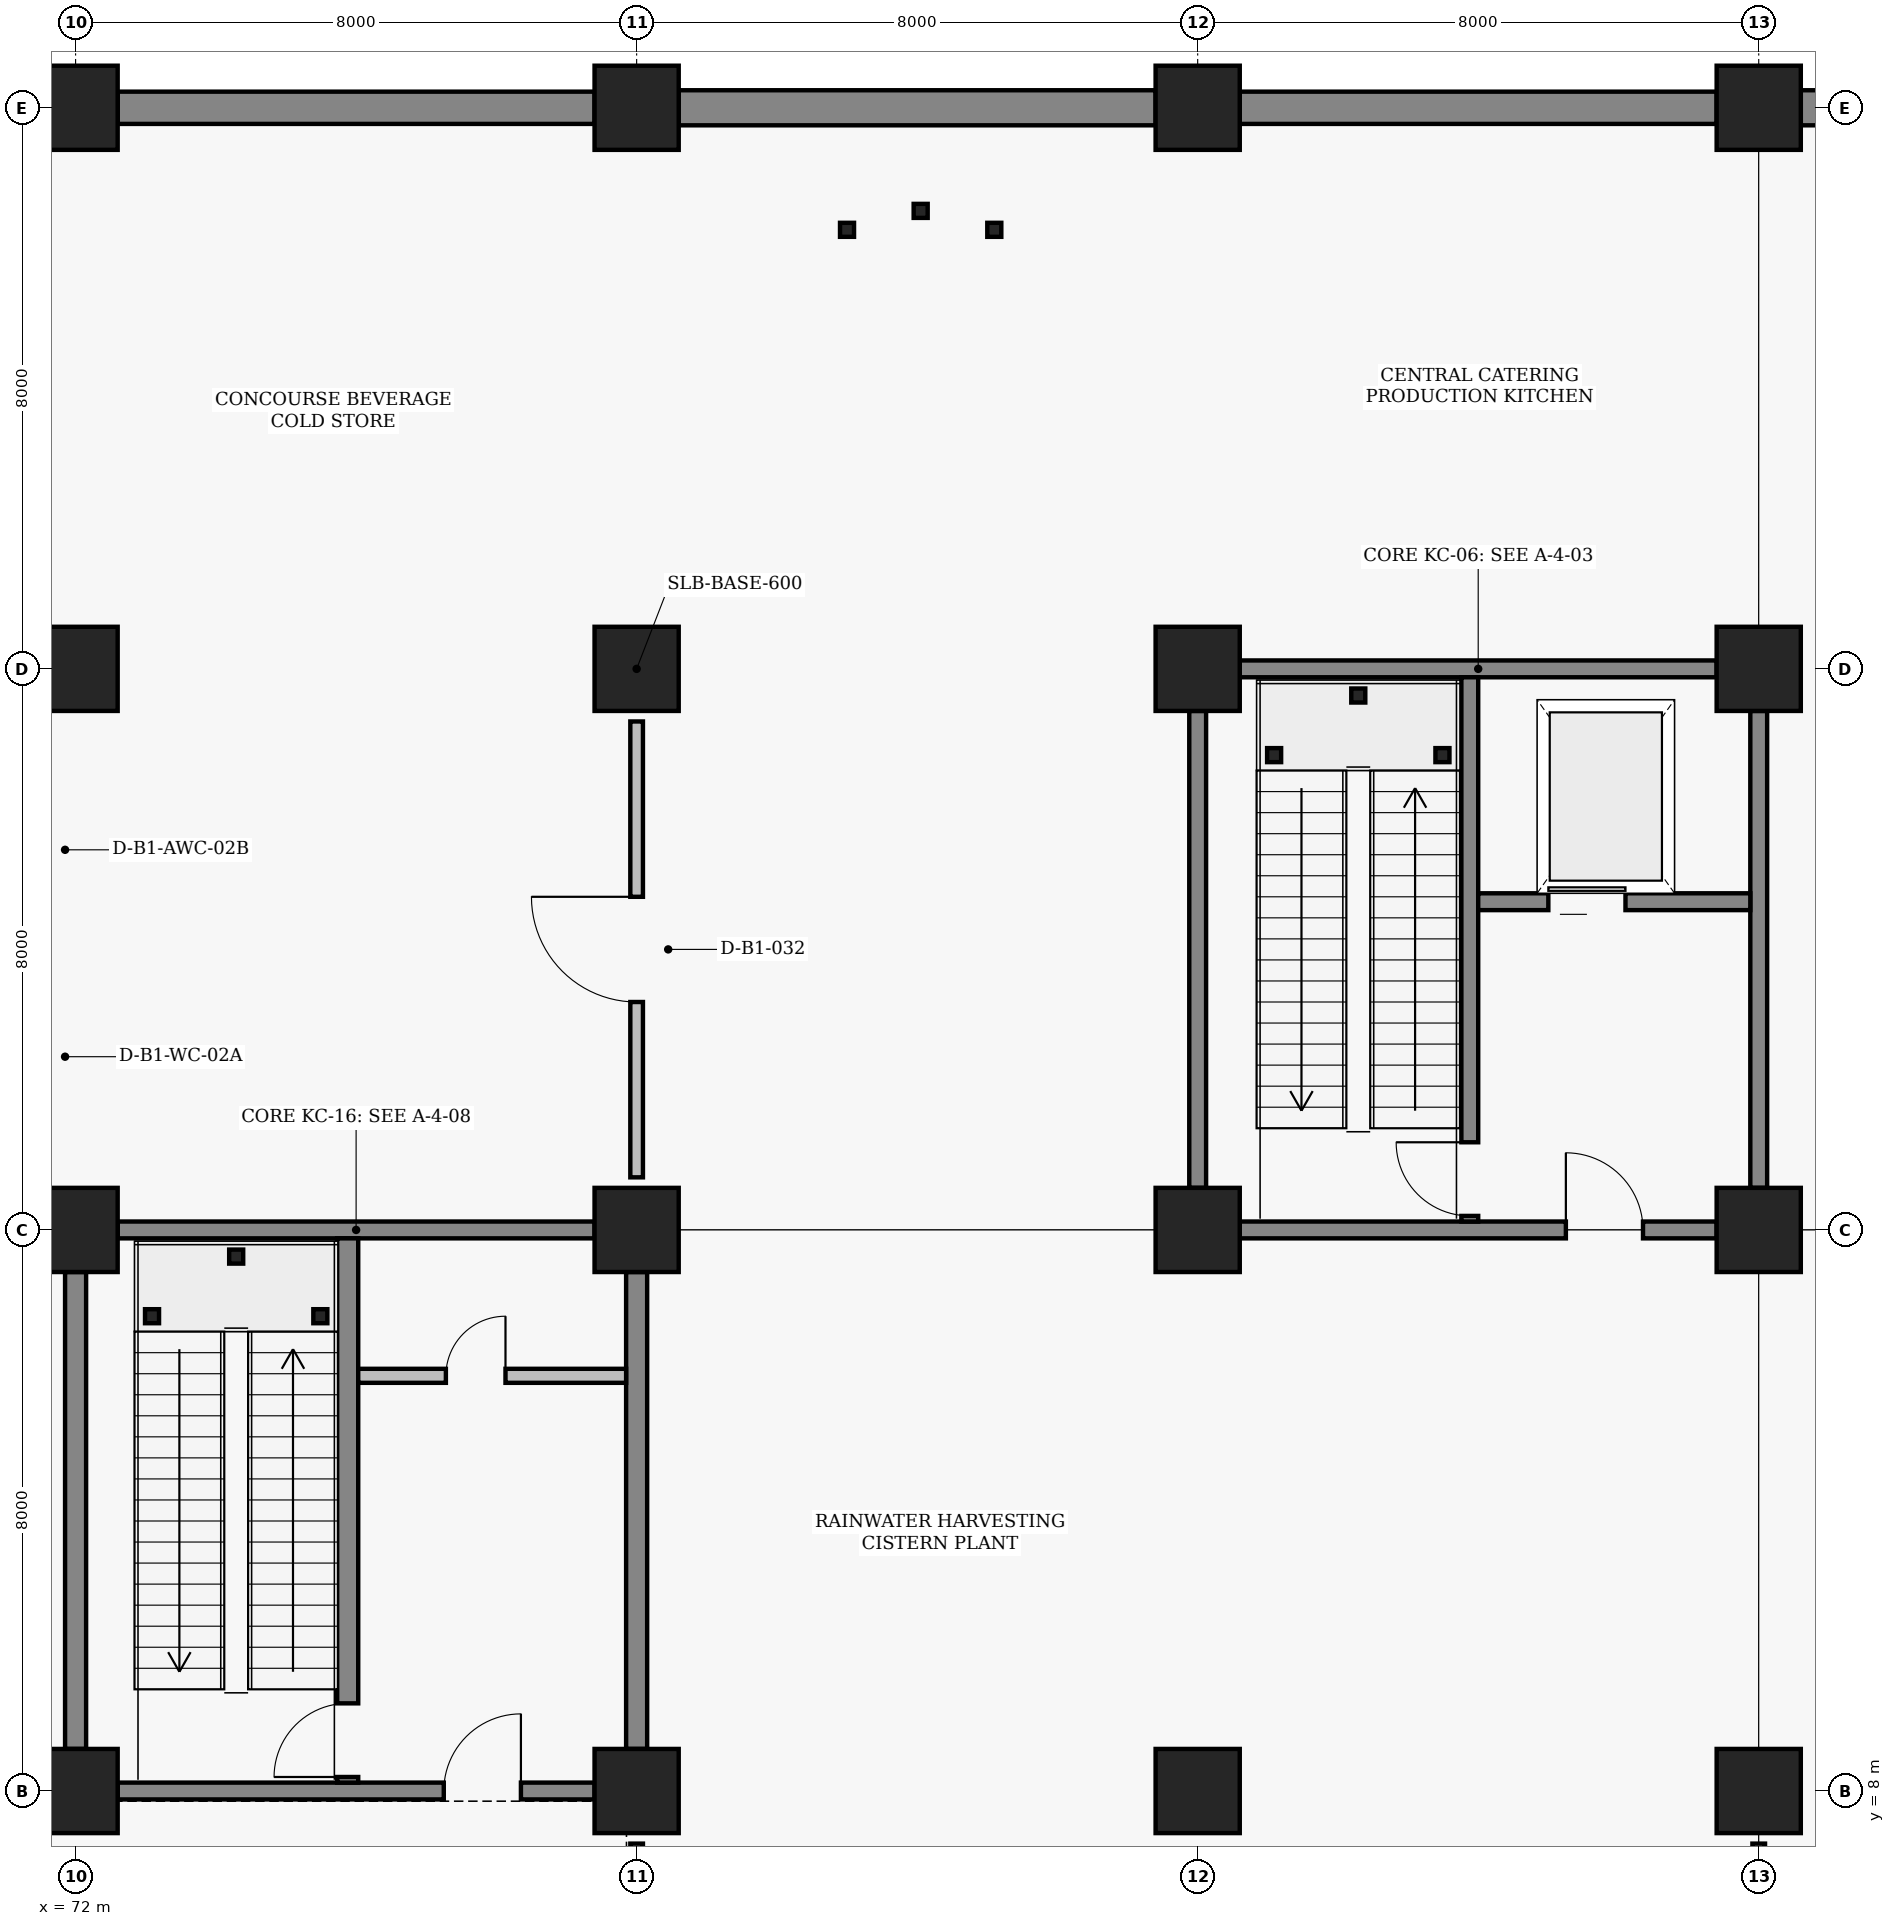
"""IFC4 building model, lengths in metres.
Left out: names, types, materials, properties, quantities, classifications, styles, units other than length and angle.
Written with IfcOpenShell. Run it as: python <this file> out.ifc"""

import sys

from ifc_helpers import new_model, si_unit, direction, frame, frame_2d, origin, origin_2d, place, context, subcontext, project, spatial, rectangle, hollow_rectangle, extrude, element, fill, save


model = new_model("IFC4")
c1 = context("Model", 3, precision=1e-05, world=origin(), true_north=direction((0.0, 1.0)))
c2 = subcontext(c1, "Body", "Model", "MODEL_VIEW")
j1 = project(units=[si_unit("LENGTHUNIT", "METRE"), si_unit("PLANEANGLEUNIT", "RADIAN")], contexts=[c1])
p1 = place(None, origin())
s1 = spatial("IfcSite", under=j1, at=p1, CompositionType="ELEMENT")
p2 = place(p1, origin())
s2 = spatial("IfcBuilding", under=s1, at=p2, CompositionType="ELEMENT")
p3 = place(p2, frame((0.0, 0.0, -5.4)))
s3 = spatial("IfcBuildingStorey", under=s2, at=p3, CompositionType="ELEMENT", Elevation=-5.4)
for number, where, z_axis, x_axis in (
    (1, (72.0, 8.0, 0.0), (0.0, 0.0, 1.0), (1.0, 0.0, 0.0)),
    (2, (72.0, 16.0, 0.0), (0.0, 0.0, 1.0), (1.0, 0.0, 0.0)),
    (3, (72.0, 24.0, 0.0), (0.0, 0.0, 1.0), (1.0, 0.0, 0.0)),
    (4, (72.0, 32.0, 0.0), (0.0, 0.0, 1.0), (1.0, 0.0, 0.0)),
    (5, (80.0, 8.0, 0.0), (0.0, 0.0, 1.0), (1.0, 0.0, 0.0)),
    (6, (80.0, 16.0, 0.0), (0.0, 0.0, 1.0), (1.0, 0.0, 0.0)),
    (7, (80.0, 24.0, 0.0), (0.0, 0.0, 1.0), (1.0, 0.0, 0.0)),
    (8, (80.0, 32.0, 0.0), (0.0, 0.0, 1.0), (1.0, 0.0, 0.0)),
    (9, (88.0, 8.0, 0.0), (0.0, 0.0, 1.0), (1.0, 0.0, 0.0)),
    (10, (88.0, 16.0, 0.0), (0.0, 0.0, 1.0), (1.0, 0.0, 0.0)),
    (11, (88.0, 24.0, 0.0), (0.0, 0.0, 1.0), (1.0, 0.0, 0.0)),
    (12, (88.0, 32.0, 0.0), (0.0, 0.0, 1.0), (1.0, 0.0, 0.0)),
    (13, (96.0, 8.0, 0.0), (0.0, 0.0, 1.0), (1.0, 0.0, 0.0)),
    (14, (96.0, 16.0, 0.0), (0.0, 0.0, 1.0), (1.0, 0.0, 0.0)),
    (15, (96.0, 24.0, 0.0), (0.0, 0.0, 1.0), (1.0, 0.0, 0.0)),
    (16, (96.0, 32.0, 0.0), (0.0, 0.0, 1.0), (1.0, 0.0, 0.0)),
):
    element("IfcColumn", number, at=place(p3, frame(where, z_axis=z_axis, x_axis=x_axis)), inside=s3, PredefinedType="COLUMN", context=c2, shape_type="SweptSolid", body=[
        extrude(rectangle(XDim=1.2, YDim=1.2, at=origin_2d()), origin(), (0.0, 0.0, 1.0), 5.4),
    ])
p4 = place(p3, frame((72.6, 32.0, 0.0), z_axis=(0.0, 0.0, 1.0), x_axis=(1.0, 0.0, 0.0)))
e17 = element("IfcWall", 17, at=p4, inside=s3, PredefinedType="STANDARD", context=c2, shape_type="SweptSolid", body=[
    extrude(rectangle(XDim=6.8, YDim=0.46, at=frame_2d((3.4, 0.0))), origin(), (0.0, 0.0, 1.0), 4.34),
])
p5 = place(p3, frame((80.6, 32.0, 0.0), z_axis=(0.0, 0.0, 1.0), x_axis=(1.0, 0.0, 0.0)))
e18 = element("IfcWall", 18, at=p5, inside=s3, PredefinedType="STANDARD", context=c2, shape_type="SweptSolid", body=[
    extrude(rectangle(XDim=6.8, YDim=0.5, at=frame_2d((3.4, 0.0))), origin(), (0.0, 0.0, 1.0), 4.34),
])
p6 = place(p3, frame((88.6, 32.0, 0.0), z_axis=(0.0, 0.0, 1.0), x_axis=(1.0, 0.0, 0.0)))
e19 = element("IfcWall", 19, at=p6, inside=s3, PredefinedType="STANDARD", context=c2, shape_type="SweptSolid", body=[
    extrude(rectangle(XDim=6.8, YDim=0.46, at=frame_2d((3.4, 0.0))), origin(), (0.0, 0.0, 1.0), 4.34),
])
p7 = place(p3, frame((96.6, 32.0, 0.0), z_axis=(0.0, 0.0, 1.0), x_axis=(1.0, 0.0, 0.0)))
e20 = element("IfcWall", 20, at=p7, inside=s3, PredefinedType="STANDARD", context=c2, shape_type="SweptSolid", body=[
    extrude(rectangle(XDim=6.8, YDim=0.5, at=frame_2d((3.4, 0.0))), origin(), (0.0, 0.0, 1.0), 4.34),
])
p8 = place(p3, frame((88.6, 16.0, 0.0), z_axis=(0.0, 0.0, 1.0), x_axis=(1.0, 0.0, 0.0)))
e21 = element("IfcWall", 21, at=p8, inside=s3, PredefinedType="SHEAR", context=c2, shape_type="SweptSolid", body=[
    extrude(rectangle(XDim=6.8, YDim=0.24, at=frame_2d((3.4, 0.0))), origin(), (0.0, 0.0, 1.0), 3.64),
])
p9 = place(p8, frame((4.65, 0.0, 0.0)))
e22 = element("IfcOpeningElement", 22, at=p9, cuts=e21, PredefinedType="OPENING", context=c2, shape_type="SweptSolid", body=[
    extrude(rectangle(XDim=1.1, YDim=2.2, at=frame_2d((0.55, 1.1))), frame((0.0, 0.13, 0.0), z_axis=(0.0, -1.0, 0.0), x_axis=(1.0, 0.0, 0.0)), (0.0, 0.0, 1.0), 0.26),
])
p10 = place(p3, frame((88.6, 24.0, 0.0), z_axis=(0.0, 0.0, 1.0), x_axis=(1.0, 0.0, 0.0)))
e23 = element("IfcWall", 23, at=p10, inside=s3, PredefinedType="SHEAR", context=c2, shape_type="SweptSolid", body=[
    extrude(rectangle(XDim=6.8, YDim=0.24, at=frame_2d((3.4, 0.0))), origin(), (0.0, 0.0, 1.0), 4.59),
])
p11 = place(p3, frame((88.0, 16.6, 0.0), z_axis=(0.0, 0.0, 1.0), x_axis=(0.0, 1.0, 0.0)))
e24 = element("IfcWall", 24, at=p11, inside=s3, PredefinedType="SHEAR", context=c2, shape_type="SweptSolid", body=[
    extrude(rectangle(XDim=6.8, YDim=0.24, at=frame_2d((3.4, 0.0))), origin(), (0.0, 0.0, 1.0), 4.39),
])
p12 = place(p3, frame((96.0, 16.6, 0.0), z_axis=(0.0, 0.0, 1.0), x_axis=(0.0, 1.0, 0.0)))
e25 = element("IfcWall", 25, at=p12, inside=s3, PredefinedType="SHEAR", context=c2, shape_type="SweptSolid", body=[
    extrude(rectangle(XDim=6.8, YDim=0.24, at=frame_2d((3.4, 0.0))), origin(), (0.0, 0.0, 1.0), 3.64),
])
p13 = place(p3, frame((91.88, 16.12, 0.0), z_axis=(0.0, 0.0, 1.0), x_axis=(0.0, 1.0, 0.0)))
e26 = element("IfcWall", 26, at=p13, inside=s3, PredefinedType="SHEAR", context=c2, shape_type="SweptSolid", body=[
    extrude(rectangle(XDim=7.76, YDim=0.24, at=frame_2d((3.88, 0.0))), origin(), (0.0, 0.0, 1.0), 4.54),
])
p14 = place(p13, frame((0.08, 0.0, 0.0)))
e27 = element("IfcOpeningElement", 27, at=p14, cuts=e26, PredefinedType="OPENING", context=c2, shape_type="SweptSolid", body=[
    extrude(rectangle(XDim=1.05, YDim=2.15, at=frame_2d((0.525, 1.075))), frame((0.0, 0.13, 0.0), z_axis=(0.0, -1.0, 0.0), x_axis=(1.0, 0.0, 0.0)), (0.0, 0.0, 1.0), 0.26),
])
p15 = place(p3, frame((92.0, 20.68, 0.0), z_axis=(0.0, 0.0, 1.0), x_axis=(1.0, 0.0, 0.0)))
e28 = element("IfcWall", 28, at=p15, inside=s3, PredefinedType="SHEAR", context=c2, shape_type="SweptSolid", body=[
    extrude(rectangle(XDim=3.88, YDim=0.24, at=frame_2d((1.94, 0.0))), origin(), (0.0, 0.0, 1.0), 4.39),
])
p16 = place(p15, frame((1.0, 0.0, 0.0)))
e29 = element("IfcOpeningElement", 29, at=p16, cuts=e28, PredefinedType="OPENING", context=c2, shape_type="SweptSolid", body=[
    extrude(rectangle(XDim=1.1, YDim=2.15, at=frame_2d((0.55, 1.075))), frame((0.0, 0.13, 0.0), z_axis=(0.0, -1.0, 0.0), x_axis=(1.0, 0.0, 0.0)), (0.0, 0.0, 1.0), 0.26),
])
for number, where, z_axis, x_axis in (
    (30, (89.09, 22.77, 0.0), (0.0, 0.0, 1.0), (1.0, 0.0, 0.0)),
    (31, (91.49, 22.77, 0.0), (0.0, 0.0, 1.0), (1.0, 0.0, 0.0)),
    (32, (90.29, 23.62, 0.0), (0.0, 0.0, 1.0), (1.0, 0.0, 0.0)),
):
    element("IfcColumn", number, at=place(p3, frame(where, z_axis=z_axis, x_axis=x_axis)), inside=s3, PredefinedType="COLUMN", context=c2, shape_type="SweptSolid", body=[
        extrude(hollow_rectangle(XDim=0.2, YDim=0.2, WallThickness=0.009, at=origin_2d()), origin(), (0.0, 0.0, 1.0), 2.5),
    ])
p17 = place(p3, frame((72.6, 8.0, 0.0), z_axis=(0.0, 0.0, 1.0), x_axis=(1.0, 0.0, 0.0)))
e33 = element("IfcWall", 33, at=p17, inside=s3, PredefinedType="SHEAR", context=c2, shape_type="SweptSolid", body=[
    extrude(rectangle(XDim=6.8, YDim=0.24, at=frame_2d((3.4, 0.0))), origin(), (0.0, 0.0, 1.0), 4.54),
])
p18 = place(p17, frame((4.65, 0.0, 0.0)))
e34 = element("IfcOpeningElement", 34, at=p18, cuts=e33, PredefinedType="OPENING", context=c2, shape_type="SweptSolid", body=[
    extrude(rectangle(XDim=1.1, YDim=2.2, at=frame_2d((0.55, 1.1))), frame((0.0, 0.13, 0.0), z_axis=(0.0, -1.0, 0.0), x_axis=(1.0, 0.0, 0.0)), (0.0, 0.0, 1.0), 0.26),
])
p19 = place(p3, frame((72.6, 16.0, 0.0), z_axis=(0.0, 0.0, 1.0), x_axis=(1.0, 0.0, 0.0)))
e35 = element("IfcWall", 35, at=p19, inside=s3, PredefinedType="SHEAR", context=c2, shape_type="SweptSolid", body=[
    extrude(rectangle(XDim=6.8, YDim=0.24, at=frame_2d((3.4, 0.0))), origin(), (0.0, 0.0, 1.0), 4.54),
])
for number, where, z_axis, x_axis in (
    (36, (72.0, 8.6, 0.0), (0.0, 0.0, 1.0), (0.0, 1.0, 0.0)),
    (37, (80.0, 8.6, 0.0), (0.0, 0.0, 1.0), (0.0, 1.0, 0.0)),
):
    element("IfcWall", number, at=place(p3, frame(where, z_axis=z_axis, x_axis=x_axis)), inside=s3, PredefinedType="SHEAR", context=c2, shape_type="SweptSolid", body=[
        extrude(rectangle(XDim=6.8, YDim=0.3, at=frame_2d((3.4, 0.0))), origin(), (0.0, 0.0, 1.0), 4.34),
    ])
p20 = place(p3, frame((75.88, 8.12, 0.0), z_axis=(0.0, 0.0, 1.0), x_axis=(0.0, 1.0, 0.0)))
e38 = element("IfcWall", 38, at=p20, inside=s3, PredefinedType="SHEAR", context=c2, shape_type="SweptSolid", body=[
    extrude(rectangle(XDim=7.76, YDim=0.3, at=frame_2d((3.88, 0.0))), origin(), (0.0, 0.0, 1.0), 4.54),
])
p21 = place(p20, frame((0.08, 0.0, 0.0)))
e39 = element("IfcOpeningElement", 39, at=p21, cuts=e38, PredefinedType="OPENING", context=c2, shape_type="SweptSolid", body=[
    extrude(rectangle(XDim=1.05, YDim=2.15, at=frame_2d((0.525, 1.075))), frame((0.0, 0.16, 0.0), z_axis=(0.0, -1.0, 0.0), x_axis=(1.0, 0.0, 0.0)), (0.0, 0.0, 1.0), 0.32),
])
p22 = place(p3, frame((76.03, 13.92, 0.0), z_axis=(0.0, 0.0, 1.0), x_axis=(1.0, 0.0, 0.0)))
e40 = element("IfcWall", 40, at=p22, inside=s3, PredefinedType="PARTITIONING", context=c2, shape_type="SweptSolid", body=[
    extrude(rectangle(XDim=3.82, YDim=0.2, at=frame_2d((1.91, 0.0))), origin(), (0.0, 0.0, 1.0), 4.34),
])
p23 = place(p22, frame((1.25, 0.0, 0.0)))
e41 = element("IfcOpeningElement", 41, at=p23, cuts=e40, PredefinedType="OPENING", context=c2, shape_type="SweptSolid", body=[
    extrude(rectangle(XDim=0.85, YDim=2.05, at=frame_2d((0.425, 1.025))), frame((0.0, 0.11, 0.0), z_axis=(0.0, -1.0, 0.0), x_axis=(1.0, 0.0, 0.0)), (0.0, 0.0, 1.0), 0.22),
])
for number, where, z_axis, x_axis in (
    (42, (73.09, 14.77, 0.0), (0.0, 0.0, 1.0), (1.0, 0.0, 0.0)),
    (43, (75.49, 14.77, 0.0), (0.0, 0.0, 1.0), (1.0, 0.0, 0.0)),
    (44, (74.29, 15.62, 0.0), (0.0, 0.0, 1.0), (1.0, 0.0, 0.0)),
):
    element("IfcColumn", number, at=place(p3, frame(where, z_axis=z_axis, x_axis=x_axis)), inside=s3, PredefinedType="COLUMN", context=c2, shape_type="SweptSolid", body=[
        extrude(hollow_rectangle(XDim=0.2, YDim=0.2, WallThickness=0.009, at=origin_2d()), origin(), (0.0, 0.0, 1.0), 2.5),
    ])
for number, where, z_axis, x_axis in (
    (45, (83.0, 30.26, 0.0), (0.0, 0.0, 1.0), (1.0, 0.0, 0.0)),
    (46, (85.1, 30.26, 0.0), (0.0, 0.0, 1.0), (1.0, 0.0, 0.0)),
    (47, (84.05, 30.53, 0.0), (0.0, 0.0, 1.0), (1.0, 0.0, 0.0)),
):
    element("IfcColumn", number, at=place(p3, frame(where, z_axis=z_axis, x_axis=x_axis)), inside=s3, PredefinedType="COLUMN", context=c2, shape_type="SweptSolid", body=[
        extrude(hollow_rectangle(XDim=0.2, YDim=0.2, WallThickness=0.009, at=origin_2d()), origin(), (0.0, 0.0, 1.0), 5.4),
    ])
p24 = place(p3, frame((80.0, 16.75, 0.0), z_axis=(0.0, 0.0, 1.0), x_axis=(0.0, 1.0, 0.0)))
e48 = element("IfcWall", 48, at=p24, inside=s3, PredefinedType="PARTITIONING", context=c2, shape_type="SweptSolid", body=[
    extrude(rectangle(XDim=6.5, YDim=0.18, at=frame_2d((3.25, 0.0))), origin(), (0.0, 0.0, 1.0), 4.39),
])
p25 = place(p24, frame((2.5, 0.0, 0.0)))
e49 = element("IfcOpeningElement", 49, at=p25, cuts=e48, PredefinedType="OPENING", context=c2, shape_type="SweptSolid", body=[
    extrude(rectangle(XDim=1.5, YDim=2.2, at=frame_2d((0.75, 1.1))), frame((0.0, 0.1, 0.0), z_axis=(0.0, -1.0, 0.0), x_axis=(1.0, 0.0, 0.0)), (0.0, 0.0, 1.0), 0.2),
])
p26 = place(p3, frame((80.0, 0.75, 0.0), z_axis=(0.0, 0.0, 1.0), x_axis=(0.0, 1.0, 0.0)))
e50 = element("IfcWall", 50, at=p26, inside=s3, PredefinedType="PARTITIONING", context=c2, shape_type="SweptSolid", body=[
    extrude(rectangle(XDim=6.5, YDim=0.18, at=frame_2d((3.25, 0.0))), origin(), (0.0, 0.0, 1.0), 4.34),
])
p27 = place(p26, frame((2.55, 0.0, 0.0)))
e51 = element("IfcOpeningElement", 51, at=p27, cuts=e50, PredefinedType="OPENING", context=c2, shape_type="SweptSolid", body=[
    extrude(rectangle(XDim=1.4, YDim=2.2, at=frame_2d((0.7, 1.1))), frame((0.0, 0.1, 0.0), z_axis=(0.0, -1.0, 0.0), x_axis=(1.0, 0.0, 0.0)), (0.0, 0.0, 1.0), 0.2),
])
p28 = place(p3, frame((96.0, 0.75, 0.0), z_axis=(0.0, 0.0, 1.0), x_axis=(0.0, 1.0, 0.0)))
e52 = element("IfcWall", 52, at=p28, inside=s3, PredefinedType="PARTITIONING", context=c2, shape_type="SweptSolid", body=[
    extrude(rectangle(XDim=6.5, YDim=0.18, at=frame_2d((3.25, 0.0))), origin(), (0.0, 0.0, 1.0), 4.34),
])
p29 = place(p28, frame((2.55, 0.0, 0.0)))
e53 = element("IfcOpeningElement", 53, at=p29, cuts=e52, PredefinedType="OPENING", context=c2, shape_type="SweptSolid", body=[
    extrude(rectangle(XDim=1.4, YDim=2.2, at=frame_2d((0.7, 1.1))), frame((0.0, 0.1, 0.0), z_axis=(0.0, -1.0, 0.0), x_axis=(1.0, 0.0, 0.0)), (0.0, 0.0, 1.0), 0.2),
])
p30 = place(p9, origin())
e54 = element("IfcDoor", 54, at=p30, inside=s3, OperationType="SINGLE_SWING_LEFT", PredefinedType="DOOR", context=c2, shape_type="SweptSolid", body=[
    extrude(rectangle(XDim=1.1, YDim=2.2, at=frame_2d((0.55, 1.1))), frame((0.0, 0.025, 0.0), z_axis=(0.0, -1.0, 0.0), x_axis=(1.0, 0.0, 0.0)), (0.0, 0.0, 1.0), 0.05),
])
fill(e22, e54)
p31 = place(p14, origin())
e55 = element("IfcDoor", 55, at=p31, inside=s3, OperationType="SINGLE_SWING_RIGHT", PredefinedType="DOOR", context=c2, shape_type="SweptSolid", body=[
    extrude(rectangle(XDim=1.05, YDim=2.15, at=frame_2d((0.525, 1.075))), frame((0.0, 0.025, 0.0), z_axis=(0.0, -1.0, 0.0), x_axis=(1.0, 0.0, 0.0)), (0.0, 0.0, 1.0), 0.05),
])
fill(e27, e55)
p32 = place(p16, origin())
e56 = element("IfcDoor", 56, at=p32, inside=s3, OperationType="SLIDING_TO_LEFT", PredefinedType="DOOR", context=c2, shape_type="SweptSolid", body=[
    extrude(rectangle(XDim=1.1, YDim=2.15, at=frame_2d((0.55, 1.075))), frame((0.0, 0.025, 0.0), z_axis=(0.0, -1.0, 0.0), x_axis=(1.0, 0.0, 0.0)), (0.0, 0.0, 1.0), 0.05),
])
fill(e29, e56)
p33 = place(p18, origin())
e57 = element("IfcDoor", 57, at=p33, inside=s3, OperationType="SINGLE_SWING_RIGHT", PredefinedType="DOOR", context=c2, shape_type="SweptSolid", body=[
    extrude(rectangle(XDim=1.1, YDim=2.2, at=frame_2d((0.55, 1.1))), frame((0.0, 0.025, 0.0), z_axis=(0.0, -1.0, 0.0), x_axis=(1.0, 0.0, 0.0)), (0.0, 0.0, 1.0), 0.05),
])
fill(e34, e57)
p34 = place(p21, origin())
e58 = element("IfcDoor", 58, at=p34, inside=s3, OperationType="SINGLE_SWING_LEFT", PredefinedType="DOOR", context=c2, shape_type="SweptSolid", body=[
    extrude(rectangle(XDim=1.05, YDim=2.15, at=frame_2d((0.525, 1.075))), frame((0.0, 0.025, 0.0), z_axis=(0.0, -1.0, 0.0), x_axis=(1.0, 0.0, 0.0)), (0.0, 0.0, 1.0), 0.05),
])
fill(e39, e58)
p35 = place(p23, origin())
e59 = element("IfcDoor", 59, at=p35, inside=s3, OperationType="SINGLE_SWING_RIGHT", PredefinedType="TRAPDOOR", context=c2, shape_type="SweptSolid", body=[
    extrude(rectangle(XDim=0.85, YDim=2.05, at=frame_2d((0.425, 1.025))), frame((0.0, 0.025, 0.0), z_axis=(0.0, -1.0, 0.0), x_axis=(1.0, 0.0, 0.0)), (0.0, 0.0, 1.0), 0.05),
])
fill(e41, e59)
p36 = place(p25, origin())
e60 = element("IfcDoor", 60, at=p36, inside=s3, OperationType="SINGLE_SWING_RIGHT", PredefinedType="DOOR", context=c2, shape_type="SweptSolid", body=[
    extrude(rectangle(XDim=1.5, YDim=2.2, at=frame_2d((0.75, 1.1))), frame((0.0, 0.025, 0.0), z_axis=(0.0, -1.0, 0.0), x_axis=(1.0, 0.0, 0.0)), (0.0, 0.0, 1.0), 0.05),
])
fill(e49, e60)
save(model, sys.argv[1])
